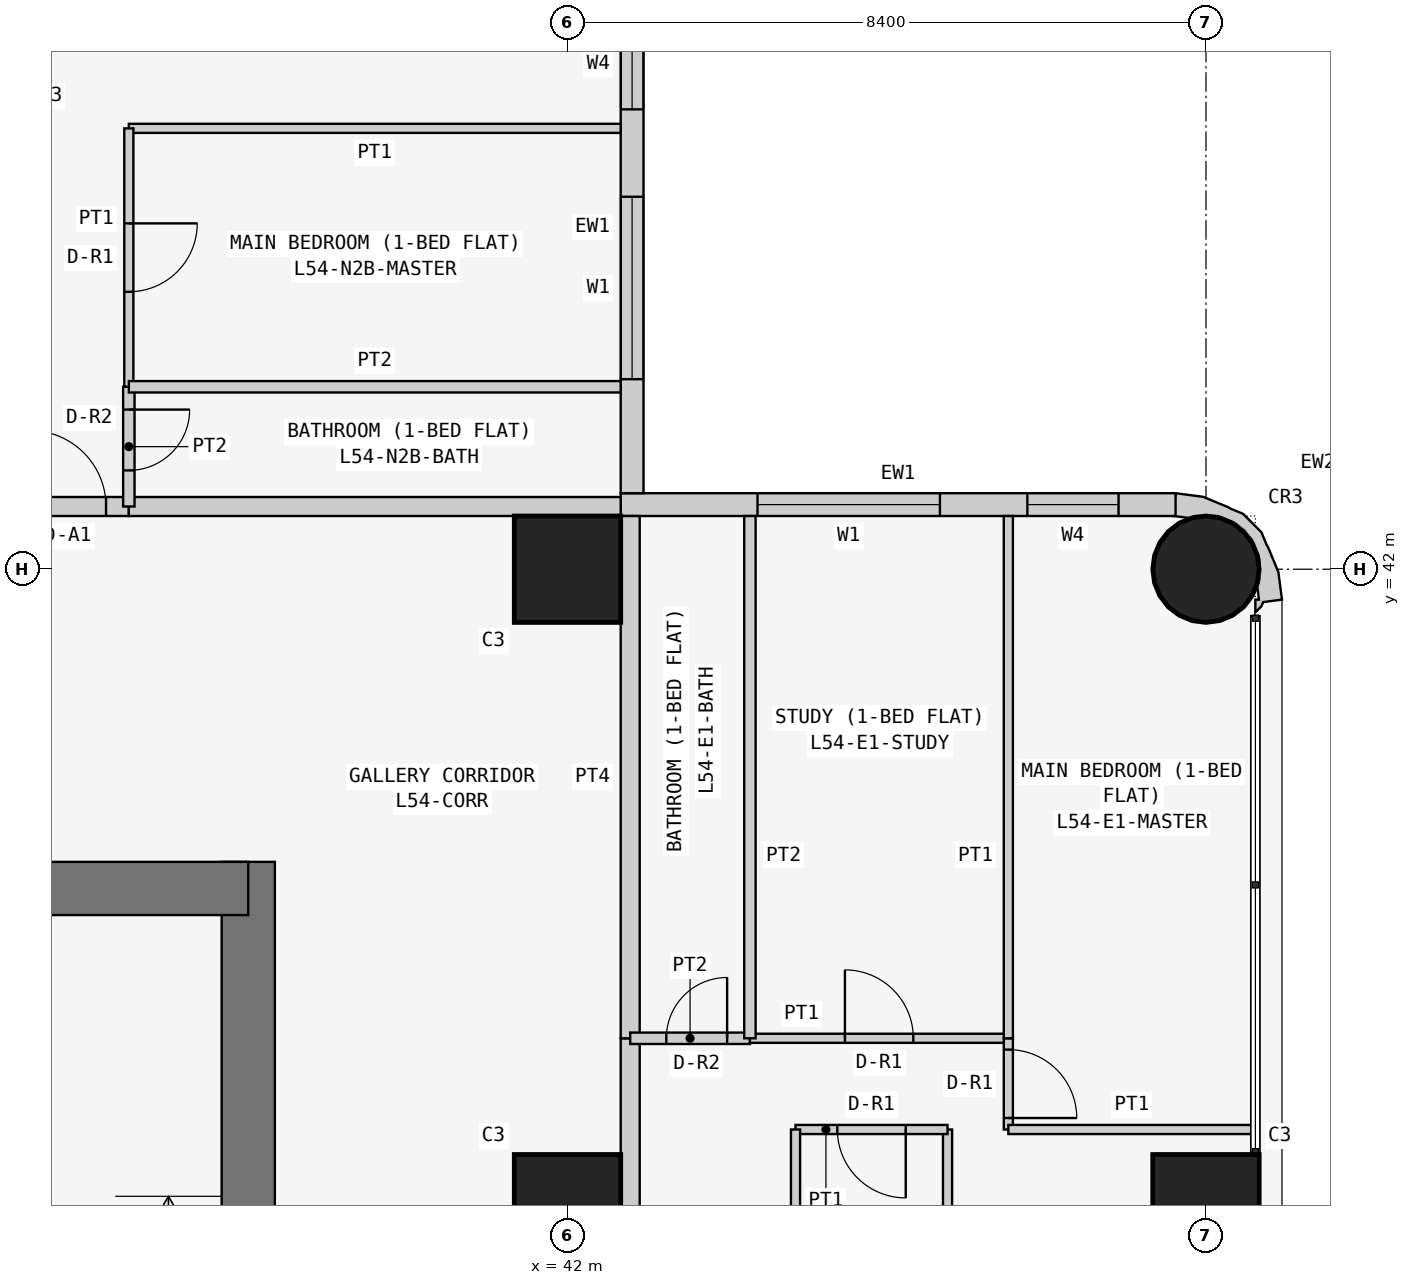
"""IFC4 building model, lengths in metres.
Left out: names, types, materials, properties, quantities, classifications, styles, units other than length and angle.
Written with IfcOpenShell. Run it as: python <this file> out.ifc"""

import sys

from ifc_helpers import new_model, si_unit, direction, frame, frame_2d, origin, origin_2d, place, context, subcontext, project, spatial, polyline, rectangle, circle, outline, extrude, element, fill, save


model = new_model("IFC4")
c1 = context("Model", 3, precision=1e-05, world=origin(), true_north=direction((0.0, 1.0)))
c2 = subcontext(c1, "Body", "Model", "MODEL_VIEW")
j1 = project(units=[si_unit("LENGTHUNIT", "METRE"), si_unit("PLANEANGLEUNIT", "RADIAN")], contexts=[c1])
p1 = place(None, origin())
s1 = spatial("IfcSite", under=j1, at=p1, CompositionType="ELEMENT")
p2 = place(p1, origin())
s2 = spatial("IfcBuilding", under=s1, at=p2, CompositionType="ELEMENT")
p3 = place(p2, frame((0.0, 0.0, 208.5)))
s3 = spatial("IfcBuildingStorey", under=s2, at=p3, CompositionType="ELEMENT", Elevation=208.5)
for number, where, z_axis, x_axis in (
    (1, (42.0, 33.6, 0.0), (0.0, 0.0, 1.0), (1.0, 0.0, 0.0)),
    (2, (42.0, 42.0, 0.0), (0.0, 0.0, 1.0), (1.0, 0.0, 0.0)),
    (3, (50.4, 33.6, 0.0), (0.0, 0.0, 1.0), (1.0, 0.0, 0.0)),
):
    element("IfcColumn", number, at=place(p3, frame(where, z_axis=z_axis, x_axis=x_axis)), inside=s3, PredefinedType="COLUMN", context=c2, shape_type="SweptSolid", body=[
        extrude(rectangle(XDim=1.4, YDim=1.4, at=origin_2d()), origin(), (0.0, 0.0, 1.0), 3.6),
    ])
p4 = place(p3, frame((50.4, 42.0, 0.0), z_axis=(0.0, 0.0, 1.0), x_axis=(1.0, 0.0, 0.0)))
e4 = element("IfcColumn", 4, at=p4, inside=s3, PredefinedType="COLUMN", context=c2, shape_type="SweptSolid", body=[
    extrude(circle(Radius=0.7, at=origin_2d()), origin(), (0.0, 0.0, 1.0), 3.6),
])
p5 = place(p3, frame((37.8, 21.0, 0.0), z_axis=(0.0, 0.0, 1.0), x_axis=(0.0, 1.0, 0.0)))
e5 = element("IfcWall", 5, at=p5, inside=s3, PredefinedType="SHEAR", context=c2, shape_type="SweptSolid", body=[
    extrude(rectangle(XDim=17.15, YDim=0.7, at=frame_2d((8.575, 0.0))), origin(), (0.0, 0.0, 1.0), 3.6),
])
p6 = place(p5, frame((5.2, 0.0, 0.0)))
e6 = element("IfcOpeningElement", 6, at=p6, cuts=e5, PredefinedType="OPENING", context=c2, shape_type="SweptSolid", body=[
    extrude(rectangle(XDim=1.2, YDim=2.1, at=frame_2d((0.6, 1.05))), frame((0.0, 0.36, 0.0), z_axis=(0.0, -1.0, 0.0), x_axis=(1.0, 0.0, 0.0)), (0.0, 0.0, 1.0), 0.72),
])
p7 = place(p3, frame((37.8, 37.8, 0.0), z_axis=(0.0, 0.0, 1.0), x_axis=(-1.0, 0.0, 0.0)))
e7 = element("IfcWall", 7, at=p7, inside=s3, PredefinedType="SHEAR", context=c2, shape_type="SweptSolid", body=[
    extrude(rectangle(XDim=17.15, YDim=0.7, at=frame_2d((8.575, 0.0))), origin(), (0.0, 0.0, 1.0), 3.6),
])
p8 = place(p3, frame((50.0, 42.85, 0.0), z_axis=(0.0, 0.0, 1.0), x_axis=(-1.0, 0.0, 0.0)))
e8 = element("IfcWall", 8, at=p8, inside=s3, PredefinedType="SOLIDWALL", context=c2, shape_type="SweptSolid", body=[
    extrude(rectangle(XDim=7.3, YDim=0.3, at=frame_2d((3.65, 0.0))), origin(), (0.0, 0.0, 1.0), 3.45),
])
p9 = place(p8, frame((3.1, 0.0, 0.9)))
e9 = element("IfcOpeningElement", 9, at=p9, cuts=e8, PredefinedType="OPENING", context=c2, shape_type="SweptSolid", body=[
    extrude(rectangle(XDim=2.4, YDim=1.5, at=frame_2d((1.2, 0.75))), frame((0.0, 0.16, 0.0), z_axis=(0.0, -1.0, 0.0), x_axis=(1.0, 0.0, 0.0)), (0.0, 0.0, 1.0), 0.32),
])
p10 = place(p8, frame((0.75, 0.0, 0.9)))
e10 = element("IfcOpeningElement", 10, at=p10, cuts=e8, PredefinedType="OPENING", context=c2, shape_type="SweptSolid", body=[
    extrude(rectangle(XDim=1.2, YDim=1.5, at=frame_2d((0.6, 0.75))), frame((0.0, 0.16, 0.0), z_axis=(0.0, -1.0, 0.0), x_axis=(1.0, 0.0, 0.0)), (0.0, 0.0, 1.0), 0.32),
])
p11 = place(p3, frame((42.85, 43.0, 0.0), z_axis=(0.0, 0.0, 1.0), x_axis=(0.0, 1.0, 0.0)))
e11 = element("IfcWall", 11, at=p11, inside=s3, PredefinedType="SOLIDWALL", context=c2, shape_type="SweptSolid", body=[
    extrude(rectangle(XDim=7.0, YDim=0.3, at=frame_2d((3.5, 0.0))), origin(), (0.0, 0.0, 1.0), 3.45),
])
p12 = place(p11, frame((1.5, 0.0, 0.9)))
e12 = element("IfcOpeningElement", 12, at=p12, cuts=e11, PredefinedType="OPENING", context=c2, shape_type="SweptSolid", body=[
    extrude(rectangle(XDim=2.4, YDim=1.5, at=frame_2d((1.2, 0.75))), frame((0.0, 0.16, 0.0), z_axis=(0.0, -1.0, 0.0), x_axis=(1.0, 0.0, 0.0)), (0.0, 0.0, 1.0), 0.32),
])
p13 = place(p11, frame((5.05, 0.0, 0.9)))
e13 = element("IfcOpeningElement", 13, at=p13, cuts=e11, PredefinedType="OPENING", context=c2, shape_type="SweptSolid", body=[
    extrude(rectangle(XDim=1.2, YDim=1.5, at=frame_2d((0.6, 0.75))), frame((0.0, 0.16, 0.0), z_axis=(0.0, -1.0, 0.0), x_axis=(1.0, 0.0, 0.0)), (0.0, 0.0, 1.0), 0.32),
])
p14 = place(p3, frame((50.988, 41.488, 0.0), z_axis=(0.0, 0.0, 1.0), x_axis=(0.898030234854, 0.439933741929, 0.0)))
e14 = element("IfcWall", 14, at=p14, inside=s3, PredefinedType="SOLIDWALL", context=c2, shape_type="SweptSolid", body=[
    extrude(outline(polyline([(0.138, -0.04), (0.182, -0.0), (0.419, -0.08), (0.536, 0.266), (0.559, 0.631), (0.555, 0.651), (0.566, 0.836), (0.455, 1.159), (0.333, 1.298), (0.324, 1.317), (0.082, 1.591), (-0.222, 1.793), (-0.39, 1.541), (-0.372, 1.532), (-0.195, 1.414), (-0.12, 1.41), (0.131, 1.287), (0.315, 1.078), (0.406, 0.814), (0.388, 0.536), (0.265, 0.285), (0.209, 0.235), (0.148, 0.053), (0.105, 0.074), (0.032, -0.076), (0.138, -0.04)])), origin(), (0.0, 0.0, 1.0), 3.45),
])
p15 = place(p3, frame((34.629, 42.825, 0.0), z_axis=(0.0, 0.0, 1.0), x_axis=(1.0, 0.0, 0.0)))
e15 = element("IfcWall", 15, at=p15, inside=s3, PredefinedType="PARTITIONING", context=c2, shape_type="SweptSolid", body=[
    extrude(rectangle(XDim=1.6, YDim=0.25, at=frame_2d((0.8, 0.0))), origin(), (0.0, 0.0, 1.0), 3.45),
])
p16 = place(p15, frame((0.3, 0.0, 0.0)))
e16 = element("IfcOpeningElement", 16, at=p16, cuts=e15, PredefinedType="OPENING", context=c2, shape_type="SweptSolid", body=[
    extrude(rectangle(XDim=1.0, YDim=2.1, at=frame_2d((0.5, 1.05))), frame((0.0, 0.135, 0.0), z_axis=(0.0, -1.0, 0.0), x_axis=(1.0, 0.0, 0.0)), (0.0, 0.0, 1.0), 0.27),
])
p17 = place(p3, frame((36.229, 42.825, 0.0), z_axis=(0.0, 0.0, 1.0), x_axis=(1.0, 0.0, 0.0)))
e17 = element("IfcWall", 17, at=p17, inside=s3, PredefinedType="PARTITIONING", context=c2, shape_type="SweptSolid", body=[
    extrude(rectangle(XDim=6.471, YDim=0.25, at=frame_2d((3.235, 0.0))), origin(), (0.0, 0.0, 1.0), 3.45),
])
p18 = place(p3, frame((42.825, 35.829, 0.0), z_axis=(0.0, 0.0, 1.0), x_axis=(0.0, -1.0, 0.0)))
e18 = element("IfcWall", 18, at=p18, inside=s3, PredefinedType="PARTITIONING", context=c2, shape_type="SweptSolid", body=[
    extrude(rectangle(XDim=6.429, YDim=0.25, at=frame_2d((3.215, 0.0))), origin(), (0.0, 0.0, 1.0), 3.45),
])
p19 = place(p18, frame((4.929, 0.0, 0.0)))
e19 = element("IfcOpeningElement", 19, at=p19, cuts=e18, PredefinedType="OPENING", context=c2, shape_type="SweptSolid", body=[
    extrude(rectangle(XDim=1.0, YDim=2.1, at=frame_2d((0.5, 1.05))), frame((0.0, 0.135, 0.0), z_axis=(0.0, -1.0, 0.0), x_axis=(1.0, 0.0, 0.0)), (0.0, 0.0, 1.0), 0.27),
])
p20 = place(p3, frame((42.825, 42.7, 0.0), z_axis=(0.0, 0.0, 1.0), x_axis=(0.0, -1.0, 0.0)))
e20 = element("IfcWall", 20, at=p20, inside=s3, PredefinedType="PARTITIONING", context=c2, shape_type="SweptSolid", body=[
    extrude(rectangle(XDim=6.871, YDim=0.25, at=frame_2d((3.436, 0.0))), origin(), (0.0, 0.0, 1.0), 3.45),
])
p21 = place(p3, frame((36.229, 44.4, 0.0), z_axis=(0.0, 0.0, 1.0), x_axis=(0.0, -1.0, 0.0)))
e21 = element("IfcWall", 21, at=p21, inside=s3, PredefinedType="PARTITIONING", context=c2, shape_type="SweptSolid", body=[
    extrude(rectangle(XDim=1.575, YDim=0.15, at=frame_2d((0.788, 0.0))), origin(), (0.0, 0.0, 1.0), 3.45),
])
p22 = place(p21, frame((0.3, 0.0, 0.0)))
e22 = element("IfcOpeningElement", 22, at=p22, cuts=e21, PredefinedType="OPENING", context=c2, shape_type="SweptSolid", body=[
    extrude(rectangle(XDim=0.8, YDim=2.1, at=frame_2d((0.4, 1.05))), frame((0.0, 0.085, 0.0), z_axis=(0.0, -1.0, 0.0), x_axis=(1.0, 0.0, 0.0)), (0.0, 0.0, 1.0), 0.17),
])
p23 = place(p3, frame((42.7, 47.8, 0.0), z_axis=(0.0, 0.0, 1.0), x_axis=(-1.0, 0.0, 0.0)))
e23 = element("IfcWall", 23, at=p23, inside=s3, PredefinedType="PARTITIONING", context=c2, shape_type="SweptSolid", body=[
    extrude(rectangle(XDim=6.471, YDim=0.12, at=frame_2d((3.235, 0.0))), origin(), (0.0, 0.0, 1.0), 3.45),
])
p24 = place(p3, frame((36.229, 47.8, 0.0), z_axis=(0.0, 0.0, 1.0), x_axis=(0.0, -1.0, 0.0)))
e24 = element("IfcWall", 24, at=p24, inside=s3, PredefinedType="PARTITIONING", context=c2, shape_type="SweptSolid", body=[
    extrude(rectangle(XDim=3.4, YDim=0.12, at=frame_2d((1.7, 0.0))), origin(), (0.0, 0.0, 1.0), 3.45),
])
p25 = place(p24, frame((1.25, 0.0, 0.0)))
e25 = element("IfcOpeningElement", 25, at=p25, cuts=e24, PredefinedType="OPENING", context=c2, shape_type="SweptSolid", body=[
    extrude(rectangle(XDim=0.9, YDim=2.1, at=frame_2d((0.45, 1.05))), frame((0.0, 0.07, 0.0), z_axis=(0.0, -1.0, 0.0), x_axis=(1.0, 0.0, 0.0)), (0.0, 0.0, 1.0), 0.14),
])
p26 = place(p3, frame((36.229, 44.4, 0.0), z_axis=(0.0, 0.0, 1.0), x_axis=(1.0, 0.0, 0.0)))
e26 = element("IfcWall", 26, at=p26, inside=s3, PredefinedType="PARTITIONING", context=c2, shape_type="SweptSolid", body=[
    extrude(rectangle(XDim=6.471, YDim=0.15, at=frame_2d((3.235, 0.0))), origin(), (0.0, 0.0, 1.0), 3.45),
])
p27 = place(p3, frame((47.0, 29.4, 0.0), z_axis=(0.0, 0.0, 1.0), x_axis=(0.0, 1.0, 0.0)))
e27 = element("IfcWall", 27, at=p27, inside=s3, PredefinedType="PARTITIONING", context=c2, shape_type="SweptSolid", body=[
    extrude(rectangle(XDim=5.229, YDim=0.12, at=frame_2d((2.615, 0.0))), origin(), (0.0, 0.0, 1.0), 3.45),
])
p28 = place(p3, frame((47.0, 34.629, 0.0), z_axis=(0.0, 0.0, 1.0), x_axis=(-1.0, 0.0, 0.0)))
e28 = element("IfcWall", 28, at=p28, inside=s3, PredefinedType="PARTITIONING", context=c2, shape_type="SweptSolid", body=[
    extrude(rectangle(XDim=2.0, YDim=0.12, at=frame_2d((1.0, 0.0))), origin(), (0.0, 0.0, 1.0), 3.45),
])
p29 = place(p28, frame((0.55, 0.0, 0.0)))
e29 = element("IfcOpeningElement", 29, at=p29, cuts=e28, PredefinedType="OPENING", context=c2, shape_type="SweptSolid", body=[
    extrude(rectangle(XDim=0.9, YDim=2.1, at=frame_2d((0.45, 1.05))), frame((0.0, 0.07, 0.0), z_axis=(0.0, -1.0, 0.0), x_axis=(1.0, 0.0, 0.0)), (0.0, 0.0, 1.0), 0.14),
])
p30 = place(p3, frame((45.0, 34.629, 0.0), z_axis=(0.0, 0.0, 1.0), x_axis=(0.0, -1.0, 0.0)))
e30 = element("IfcWall", 30, at=p30, inside=s3, PredefinedType="PARTITIONING", context=c2, shape_type="SweptSolid", body=[
    extrude(rectangle(XDim=5.229, YDim=0.12, at=frame_2d((2.615, 0.0))), origin(), (0.0, 0.0, 1.0), 3.45),
])
p31 = place(p3, frame((42.825, 35.829, 0.0), z_axis=(0.0, 0.0, 1.0), x_axis=(1.0, 0.0, 0.0)))
e31 = element("IfcWall", 31, at=p31, inside=s3, PredefinedType="PARTITIONING", context=c2, shape_type="SweptSolid", body=[
    extrude(rectangle(XDim=1.575, YDim=0.15, at=frame_2d((0.788, 0.0))), origin(), (0.0, 0.0, 1.0), 3.45),
])
p32 = place(p31, frame((0.475, 0.0, 0.0)))
e32 = element("IfcOpeningElement", 32, at=p32, cuts=e31, PredefinedType="OPENING", context=c2, shape_type="SweptSolid", body=[
    extrude(rectangle(XDim=0.8, YDim=2.1, at=frame_2d((0.4, 1.05))), frame((0.0, 0.085, 0.0), z_axis=(0.0, -1.0, 0.0), x_axis=(1.0, 0.0, 0.0)), (0.0, 0.0, 1.0), 0.17),
])
p33 = place(p3, frame((44.4, 35.829, 0.0), z_axis=(0.0, 0.0, 1.0), x_axis=(1.0, 0.0, 0.0)))
e33 = element("IfcWall", 33, at=p33, inside=s3, PredefinedType="PARTITIONING", context=c2, shape_type="SweptSolid", body=[
    extrude(rectangle(XDim=3.4, YDim=0.12, at=frame_2d((1.7, 0.0))), origin(), (0.0, 0.0, 1.0), 3.45),
])
p34 = place(p33, frame((1.25, 0.0, 0.0)))
e34 = element("IfcOpeningElement", 34, at=p34, cuts=e33, PredefinedType="OPENING", context=c2, shape_type="SweptSolid", body=[
    extrude(rectangle(XDim=0.9, YDim=2.1, at=frame_2d((0.45, 1.05))), frame((0.0, 0.07, 0.0), z_axis=(0.0, -1.0, 0.0), x_axis=(1.0, 0.0, 0.0)), (0.0, 0.0, 1.0), 0.14),
])
p35 = place(p3, frame((47.8, 35.829, 0.0), z_axis=(0.0, 0.0, 1.0), x_axis=(0.0, -1.0, 0.0)))
e35 = element("IfcWall", 35, at=p35, inside=s3, PredefinedType="PARTITIONING", context=c2, shape_type="SweptSolid", body=[
    extrude(rectangle(XDim=1.2, YDim=0.12, at=frame_2d((0.6, 0.0))), origin(), (0.0, 0.0, 1.0), 3.45),
])
p36 = place(p35, frame((0.149, 0.0, 0.0)))
e36 = element("IfcOpeningElement", 36, at=p36, cuts=e35, PredefinedType="OPENING", context=c2, shape_type="SweptSolid", body=[
    extrude(rectangle(XDim=0.9, YDim=2.1, at=frame_2d((0.45, 1.05))), frame((0.0, 0.07, 0.0), z_axis=(0.0, -1.0, 0.0), x_axis=(1.0, 0.0, 0.0)), (0.0, 0.0, 1.0), 0.14),
])
p37 = place(p3, frame((47.8, 34.629, 0.0), z_axis=(0.0, 0.0, 1.0), x_axis=(1.0, 0.0, 0.0)))
e37 = element("IfcWall", 37, at=p37, inside=s3, PredefinedType="PARTITIONING", context=c2, shape_type="SweptSolid", body=[
    extrude(rectangle(XDim=3.25, YDim=0.12, at=frame_2d((1.625, 0.0))), origin(), (0.0, 0.0, 1.0), 3.45),
])
p38 = place(p3, frame((44.4, 35.829, 0.0), z_axis=(0.0, 0.0, 1.0), x_axis=(0.0, 1.0, 0.0)))
e38 = element("IfcWall", 38, at=p38, inside=s3, PredefinedType="PARTITIONING", context=c2, shape_type="SweptSolid", body=[
    extrude(rectangle(XDim=6.871, YDim=0.15, at=frame_2d((3.436, 0.0))), origin(), (0.0, 0.0, 1.0), 3.45),
])
p39 = place(p3, frame((47.8, 35.829, 0.0), z_axis=(0.0, 0.0, 1.0), x_axis=(0.0, 1.0, 0.0)))
e39 = element("IfcWall", 39, at=p39, inside=s3, PredefinedType="PARTITIONING", context=c2, shape_type="SweptSolid", body=[
    extrude(rectangle(XDim=6.871, YDim=0.12, at=frame_2d((3.436, 0.0))), origin(), (0.0, 0.0, 1.0), 3.45),
])
p40 = place(p12, origin())
e40 = element("IfcWindow", 40, at=p40, inside=s3, PartitioningType="SINGLE_PANEL", PredefinedType="WINDOW", context=c2, shape_type="SweptSolid", body=[
    extrude(rectangle(XDim=2.4, YDim=1.5, at=frame_2d((1.2, 0.75))), frame((0.0, 0.03, 0.0), z_axis=(0.0, -1.0, 0.0), x_axis=(1.0, 0.0, 0.0)), (0.0, 0.0, 1.0), 0.06),
])
fill(e12, e40)
p41 = place(p13, origin())
e41 = element("IfcWindow", 41, at=p41, inside=s3, PartitioningType="SINGLE_PANEL", PredefinedType="WINDOW", context=c2, shape_type="SweptSolid", body=[
    extrude(rectangle(XDim=1.2, YDim=1.5, at=frame_2d((0.6, 0.75))), frame((0.0, 0.03, 0.0), z_axis=(0.0, -1.0, 0.0), x_axis=(1.0, 0.0, 0.0)), (0.0, 0.0, 1.0), 0.06),
])
fill(e13, e41)
p42 = place(p9, origin())
e42 = element("IfcWindow", 42, at=p42, inside=s3, PartitioningType="SINGLE_PANEL", PredefinedType="WINDOW", context=c2, shape_type="SweptSolid", body=[
    extrude(rectangle(XDim=2.4, YDim=1.5, at=frame_2d((1.2, 0.75))), frame((0.0, 0.03, 0.0), z_axis=(0.0, -1.0, 0.0), x_axis=(1.0, 0.0, 0.0)), (0.0, 0.0, 1.0), 0.06),
])
fill(e9, e42)
p43 = place(p10, origin())
e43 = element("IfcWindow", 43, at=p43, inside=s3, PartitioningType="SINGLE_PANEL", PredefinedType="WINDOW", context=c2, shape_type="SweptSolid", body=[
    extrude(rectangle(XDim=1.2, YDim=1.5, at=frame_2d((0.6, 0.75))), frame((0.0, 0.03, 0.0), z_axis=(0.0, -1.0, 0.0), x_axis=(1.0, 0.0, 0.0)), (0.0, 0.0, 1.0), 0.06),
])
fill(e10, e43)
p44 = place(p16, origin())
e44 = element("IfcDoor", 44, at=p44, inside=s3, OperationType="SINGLE_SWING_LEFT", PredefinedType="DOOR", context=c2, shape_type="SweptSolid", body=[
    extrude(rectangle(XDim=1.0, YDim=2.1, at=frame_2d((0.5, 1.05))), frame((0.0, 0.025, 0.0), z_axis=(0.0, -1.0, 0.0), x_axis=(1.0, 0.0, 0.0)), (0.0, 0.0, 1.0), 0.05),
])
fill(e16, e44)
p45 = place(p22, origin())
e45 = element("IfcDoor", 45, at=p45, inside=s3, OperationType="SINGLE_SWING_LEFT", PredefinedType="DOOR", context=c2, shape_type="SweptSolid", body=[
    extrude(rectangle(XDim=0.8, YDim=2.1, at=frame_2d((0.4, 1.05))), frame((0.0, 0.025, 0.0), z_axis=(0.0, -1.0, 0.0), x_axis=(1.0, 0.0, 0.0)), (0.0, 0.0, 1.0), 0.05),
])
fill(e22, e45)
p46 = place(p25, origin())
e46 = element("IfcDoor", 46, at=p46, inside=s3, OperationType="SINGLE_SWING_LEFT", PredefinedType="DOOR", context=c2, shape_type="SweptSolid", body=[
    extrude(rectangle(XDim=0.9, YDim=2.1, at=frame_2d((0.45, 1.05))), frame((0.0, 0.025, 0.0), z_axis=(0.0, -1.0, 0.0), x_axis=(1.0, 0.0, 0.0)), (0.0, 0.0, 1.0), 0.05),
])
fill(e25, e46)
p47 = place(p29, origin())
e47 = element("IfcDoor", 47, at=p47, inside=s3, OperationType="SINGLE_SWING_LEFT", PredefinedType="DOOR", context=c2, shape_type="SweptSolid", body=[
    extrude(rectangle(XDim=0.9, YDim=2.1, at=frame_2d((0.45, 1.05))), frame((0.0, 0.025, 0.0), z_axis=(0.0, -1.0, 0.0), x_axis=(1.0, 0.0, 0.0)), (0.0, 0.0, 1.0), 0.05),
])
fill(e29, e47)
p48 = place(p32, origin())
e48 = element("IfcDoor", 48, at=p48, inside=s3, OperationType="SINGLE_SWING_RIGHT", PredefinedType="DOOR", context=c2, shape_type="SweptSolid", body=[
    extrude(rectangle(XDim=0.8, YDim=2.1, at=frame_2d((0.4, 1.05))), frame((0.0, 0.025, 0.0), z_axis=(0.0, -1.0, 0.0), x_axis=(1.0, 0.0, 0.0)), (0.0, 0.0, 1.0), 0.05),
])
fill(e32, e48)
p49 = place(p34, origin())
e49 = element("IfcDoor", 49, at=p49, inside=s3, OperationType="SINGLE_SWING_LEFT", PredefinedType="DOOR", context=c2, shape_type="SweptSolid", body=[
    extrude(rectangle(XDim=0.9, YDim=2.1, at=frame_2d((0.45, 1.05))), frame((0.0, 0.025, 0.0), z_axis=(0.0, -1.0, 0.0), x_axis=(1.0, 0.0, 0.0)), (0.0, 0.0, 1.0), 0.05),
])
fill(e34, e49)
p50 = place(p36, origin())
e50 = element("IfcDoor", 50, at=p50, inside=s3, OperationType="SINGLE_SWING_RIGHT", PredefinedType="DOOR", context=c2, shape_type="SweptSolid", body=[
    extrude(rectangle(XDim=0.9, YDim=2.1, at=frame_2d((0.45, 1.05))), frame((0.0, 0.025, 0.0), z_axis=(0.0, -1.0, 0.0), x_axis=(1.0, 0.0, 0.0)), (0.0, 0.0, 1.0), 0.05),
])
fill(e36, e50)
save(model, sys.argv[1])
